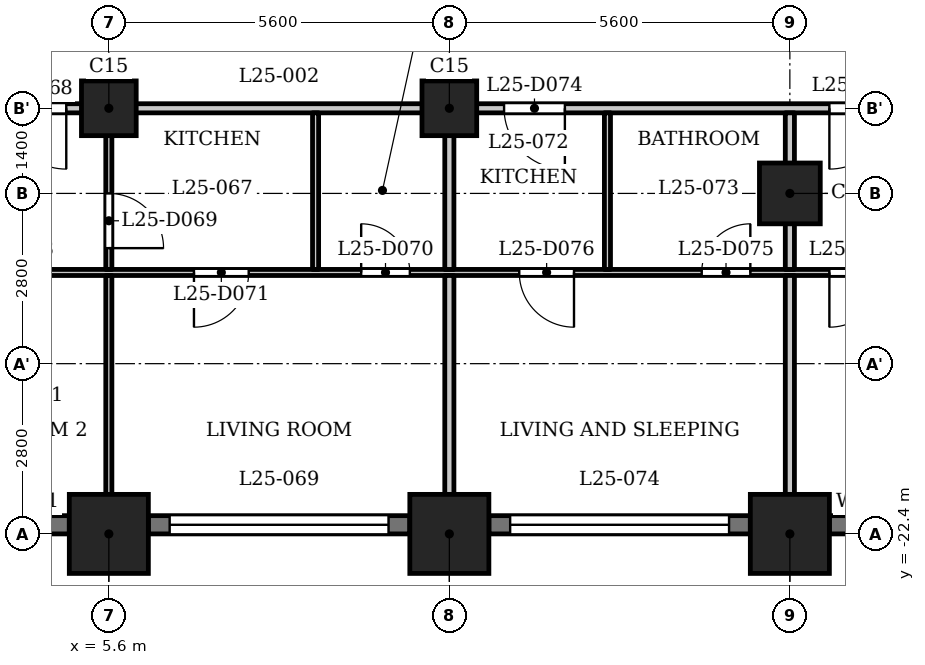
"""IFC4 building model, lengths in metres.
Left out: names, types, materials, properties, quantities, classifications, styles, units other than length and angle.
Written with IfcOpenShell. Run it as: python <this file> out.ifc"""

import sys

from ifc_helpers import new_model, si_unit, direction, frame, frame_2d, origin, origin_2d, place, context, subcontext, project, spatial, rectangle, extrude, element, fill, save


model = new_model("IFC4")
c1 = context("Model", 3, precision=1e-05, world=origin(), true_north=direction((0.0, 1.0)))
c2 = subcontext(c1, "Body", "Model", "MODEL_VIEW")
j1 = project(units=[si_unit("LENGTHUNIT", "METRE"), si_unit("PLANEANGLEUNIT", "RADIAN")], contexts=[c1])
p1 = place(None, origin())
s1 = spatial("IfcSite", under=j1, at=p1, CompositionType="ELEMENT")
p2 = place(p1, origin())
s2 = spatial("IfcBuilding", under=s1, at=p2, CompositionType="ELEMENT")
p3 = place(p2, frame((0.0, 0.0, 100.8)))
s3 = spatial("IfcBuildingStorey", under=s2, at=p3, CompositionType="ELEMENT", Elevation=100.8)
for number, where, z_axis, x_axis in (
    (1, (5.6, -22.4, 0.0), (0.0, 0.0, 1.0), (1.0, 0.0, 0.0)),
    (2, (11.2, -22.4, 0.0), (0.0, 0.0, 1.0), (1.0, 0.0, 0.0)),
    (3, (16.8, -22.4, 0.0), (0.0, 0.0, 1.0), (1.0, 0.0, 0.0)),
):
    element("IfcColumn", number, at=place(p3, frame(where, z_axis=z_axis, x_axis=x_axis)), inside=s3, PredefinedType="COLUMN", context=c2, shape_type="SweptSolid", body=[
        extrude(rectangle(XDim=1.3, YDim=1.3, at=origin_2d()), origin(), (0.0, 0.0, 1.0), 3.5),
    ])
p4 = place(p3, frame((16.8, -16.8, 0.0), z_axis=(0.0, 0.0, 1.0), x_axis=(1.0, 0.0, 0.0)))
e4 = element("IfcColumn", 4, at=p4, inside=s3, PredefinedType="COLUMN", context=c2, shape_type="SweptSolid", body=[
    extrude(rectangle(XDim=1.0, YDim=1.0, at=origin_2d()), origin(), (0.0, 0.0, 1.0), 3.5),
])
for number, where, z_axis, x_axis in (
    (5, (5.6, -15.4, 0.0), (0.0, 0.0, 1.0), (1.0, 0.0, 0.0)),
    (6, (11.2, -15.4, 0.0), (0.0, 0.0, 1.0), (1.0, 0.0, 0.0)),
):
    element("IfcColumn", number, at=place(p3, frame(where, z_axis=z_axis, x_axis=x_axis)), inside=s3, PredefinedType="COLUMN", context=c2, shape_type="SweptSolid", body=[
        extrude(rectangle(XDim=0.9, YDim=0.9, at=origin_2d()), origin(), (0.0, 0.0, 1.0), 3.5),
    ])
p5 = place(p3, frame((0.65, -22.25, 0.0), z_axis=(0.0, 0.0, 1.0), x_axis=(1.0, 0.0, 0.0)))
e7 = element("IfcWall", 7, at=p5, inside=s3, PredefinedType="SOLIDWALL", context=c2, shape_type="SweptSolid", body=[
    extrude(rectangle(XDim=4.3, YDim=0.3, at=frame_2d((2.15, 0.0))), origin(), (0.0, 0.0, 1.0), 2.4),
])
p6 = place(p5, frame((0.438, 0.0, 0.6)))
e8 = element("IfcOpeningElement", 8, at=p6, cuts=e7, PredefinedType="OPENING", context=c2, shape_type="SweptSolid", body=[
    extrude(rectangle(XDim=1.2, YDim=1.55, at=frame_2d((0.6, 0.775))), frame((0.0, 0.16, 0.0), z_axis=(0.0, -1.0, 0.0), x_axis=(1.0, 0.0, 0.0)), (0.0, 0.0, 1.0), 0.32),
])
p7 = place(p5, frame((2.663, 0.0, 0.6)))
e9 = element("IfcOpeningElement", 9, at=p7, cuts=e7, PredefinedType="OPENING", context=c2, shape_type="SweptSolid", body=[
    extrude(rectangle(XDim=1.2, YDim=1.55, at=frame_2d((0.6, 0.775))), frame((0.0, 0.16, 0.0), z_axis=(0.0, -1.0, 0.0), x_axis=(1.0, 0.0, 0.0)), (0.0, 0.0, 1.0), 0.32),
])
p8 = place(p3, frame((6.25, -22.25, 0.0), z_axis=(0.0, 0.0, 1.0), x_axis=(1.0, 0.0, 0.0)))
e10 = element("IfcWall", 10, at=p8, inside=s3, PredefinedType="SOLIDWALL", context=c2, shape_type="SweptSolid", body=[
    extrude(rectangle(XDim=4.3, YDim=0.3, at=frame_2d((2.15, 0.0))), origin(), (0.0, 0.0, 1.0), 2.4),
])
p9 = place(p8, frame((0.35, 0.0, 1.2)))
e11 = element("IfcOpeningElement", 11, at=p9, cuts=e10, PredefinedType="OPENING", context=c2, shape_type="SweptSolid", body=[
    extrude(rectangle(XDim=3.6, YDim=0.95, at=frame_2d((1.8, 0.475))), frame((0.0, 0.16, 0.0), z_axis=(0.0, -1.0, 0.0), x_axis=(1.0, 0.0, 0.0)), (0.0, 0.0, 1.0), 0.32),
])
p10 = place(p3, frame((11.85, -22.25, 0.0), z_axis=(0.0, 0.0, 1.0), x_axis=(1.0, 0.0, 0.0)))
e12 = element("IfcWall", 12, at=p10, inside=s3, PredefinedType="SOLIDWALL", context=c2, shape_type="SweptSolid", body=[
    extrude(rectangle(XDim=4.3, YDim=0.3, at=frame_2d((2.15, 0.0))), origin(), (0.0, 0.0, 1.0), 2.4),
])
p11 = place(p10, frame((0.35, 0.0, 1.2)))
e13 = element("IfcOpeningElement", 13, at=p11, cuts=e12, PredefinedType="OPENING", context=c2, shape_type="SweptSolid", body=[
    extrude(rectangle(XDim=3.6, YDim=0.95, at=frame_2d((1.8, 0.475))), frame((0.0, 0.16, 0.0), z_axis=(0.0, -1.0, 0.0), x_axis=(1.0, 0.0, 0.0)), (0.0, 0.0, 1.0), 0.32),
])
p12 = place(p3, frame((17.45, -22.25, 0.0), z_axis=(0.0, 0.0, 1.0), x_axis=(1.0, 0.0, 0.0)))
e14 = element("IfcWall", 14, at=p12, inside=s3, PredefinedType="SOLIDWALL", context=c2, shape_type="SweptSolid", body=[
    extrude(rectangle(XDim=2.55, YDim=0.3, at=frame_2d((1.275, 0.0))), origin(), (0.0, 0.0, 1.0), 2.4),
])
p13 = place(p12, frame((0.375, 0.0, 0.9)))
e15 = element("IfcOpeningElement", 15, at=p13, cuts=e14, PredefinedType="OPENING", context=c2, shape_type="SweptSolid", body=[
    extrude(rectangle(XDim=1.8, YDim=1.25, at=frame_2d((0.9, 0.625))), frame((0.0, 0.16, 0.0), z_axis=(0.0, -1.0, 0.0), x_axis=(1.0, 0.0, 0.0)), (0.0, 0.0, 1.0), 0.32),
])
p14 = place(p3, frame((-26.19, -18.1, 0.0), z_axis=(0.0, 0.0, 1.0), x_axis=(1.0, 0.0, 0.0)))
e16 = element("IfcWall", 16, at=p14, inside=s3, PredefinedType="PARTITIONING", context=c2, shape_type="SweptSolid", body=[
    extrude(rectangle(XDim=52.63, YDim=0.1, at=frame_2d((26.315, 0.0))), origin(), (0.0, 0.0, 1.0), 3.2),
])
p15 = place(p14, frame((1.09, 0.0, 0.0)))
e17 = element("IfcOpeningElement", 17, at=p15, cuts=e16, PredefinedType="OPENING", context=c2, shape_type="SweptSolid", body=[
    extrude(rectangle(XDim=0.8, YDim=2.1, at=frame_2d((0.4, 1.05))), frame((0.0, 0.06, 0.0), z_axis=(0.0, -1.0, 0.0), x_axis=(1.0, 0.0, 0.0)), (0.0, 0.0, 1.0), 0.12),
])
p16 = place(p14, frame((4.44, 0.0, 0.0)))
e18 = element("IfcOpeningElement", 18, at=p16, cuts=e16, PredefinedType="OPENING", context=c2, shape_type="SweptSolid", body=[
    extrude(rectangle(XDim=0.9, YDim=2.1, at=frame_2d((0.45, 1.05))), frame((0.0, 0.06, 0.0), z_axis=(0.0, -1.0, 0.0), x_axis=(1.0, 0.0, 0.0)), (0.0, 0.0, 1.0), 0.12),
])
p17 = place(p14, frame((10.04, 0.0, 0.0)))
e19 = element("IfcOpeningElement", 19, at=p17, cuts=e16, PredefinedType="OPENING", context=c2, shape_type="SweptSolid", body=[
    extrude(rectangle(XDim=0.8, YDim=2.1, at=frame_2d((0.4, 1.05))), frame((0.0, 0.06, 0.0), z_axis=(0.0, -1.0, 0.0), x_axis=(1.0, 0.0, 0.0)), (0.0, 0.0, 1.0), 0.12),
])
p18 = place(p14, frame((15.64, 0.0, 0.0)))
e20 = element("IfcOpeningElement", 20, at=p18, cuts=e16, PredefinedType="OPENING", context=c2, shape_type="SweptSolid", body=[
    extrude(rectangle(XDim=0.9, YDim=2.1, at=frame_2d((0.45, 1.05))), frame((0.0, 0.06, 0.0), z_axis=(0.0, -1.0, 0.0), x_axis=(1.0, 0.0, 0.0)), (0.0, 0.0, 1.0), 0.12),
])
p19 = place(p14, frame((24.74, 0.0, 0.0)))
e21 = element("IfcOpeningElement", 21, at=p19, cuts=e16, PredefinedType="OPENING", context=c2, shape_type="SweptSolid", body=[
    extrude(rectangle(XDim=0.8, YDim=2.1, at=frame_2d((0.4, 1.05))), frame((0.0, 0.06, 0.0), z_axis=(0.0, -1.0, 0.0), x_axis=(1.0, 0.0, 0.0)), (0.0, 0.0, 1.0), 0.12),
])
p20 = place(p14, frame((21.24, 0.0, 0.0)))
e22 = element("IfcOpeningElement", 22, at=p20, cuts=e16, PredefinedType="OPENING", context=c2, shape_type="SweptSolid", body=[
    extrude(rectangle(XDim=0.9, YDim=2.1, at=frame_2d((0.45, 1.05))), frame((0.0, 0.06, 0.0), z_axis=(0.0, -1.0, 0.0), x_axis=(1.0, 0.0, 0.0)), (0.0, 0.0, 1.0), 0.12),
])
p21 = place(p14, frame((35.94, 0.0, 0.0)))
e23 = element("IfcOpeningElement", 23, at=p21, cuts=e16, PredefinedType="OPENING", context=c2, shape_type="SweptSolid", body=[
    extrude(rectangle(XDim=0.8, YDim=2.1, at=frame_2d((0.4, 1.05))), frame((0.0, 0.06, 0.0), z_axis=(0.0, -1.0, 0.0), x_axis=(1.0, 0.0, 0.0)), (0.0, 0.0, 1.0), 0.12),
])
p22 = place(p14, frame((33.19, 0.0, 0.0)))
e24 = element("IfcOpeningElement", 24, at=p22, cuts=e16, PredefinedType="OPENING", context=c2, shape_type="SweptSolid", body=[
    extrude(rectangle(XDim=0.9, YDim=2.1, at=frame_2d((0.45, 1.05))), frame((0.0, 0.06, 0.0), z_axis=(0.0, -1.0, 0.0), x_axis=(1.0, 0.0, 0.0)), (0.0, 0.0, 1.0), 0.12),
])
p23 = place(p14, frame((27.59, 0.0, 0.0)))
e25 = element("IfcOpeningElement", 25, at=p23, cuts=e16, PredefinedType="OPENING", context=c2, shape_type="SweptSolid", body=[
    extrude(rectangle(XDim=0.9, YDim=2.1, at=frame_2d((0.45, 1.05))), frame((0.0, 0.06, 0.0), z_axis=(0.0, -1.0, 0.0), x_axis=(1.0, 0.0, 0.0)), (0.0, 0.0, 1.0), 0.12),
])
p24 = place(p14, frame((29.64, 0.0, 0.0)))
e26 = element("IfcOpeningElement", 26, at=p24, cuts=e16, PredefinedType="OPENING", context=c2, shape_type="SweptSolid", body=[
    extrude(rectangle(XDim=0.9, YDim=2.1, at=frame_2d((0.45, 1.05))), frame((0.0, 0.06, 0.0), z_axis=(0.0, -1.0, 0.0), x_axis=(1.0, 0.0, 0.0)), (0.0, 0.0, 1.0), 0.12),
])
p25 = place(p14, frame((41.54, 0.0, 0.0)))
e27 = element("IfcOpeningElement", 27, at=p25, cuts=e16, PredefinedType="OPENING", context=c2, shape_type="SweptSolid", body=[
    extrude(rectangle(XDim=0.8, YDim=2.1, at=frame_2d((0.4, 1.05))), frame((0.0, 0.06, 0.0), z_axis=(0.0, -1.0, 0.0), x_axis=(1.0, 0.0, 0.0)), (0.0, 0.0, 1.0), 0.12),
])
p26 = place(p14, frame((38.54, 0.0, 0.0)))
e28 = element("IfcOpeningElement", 28, at=p26, cuts=e16, PredefinedType="OPENING", context=c2, shape_type="SweptSolid", body=[
    extrude(rectangle(XDim=0.9, YDim=2.1, at=frame_2d((0.45, 1.05))), frame((0.0, 0.06, 0.0), z_axis=(0.0, -1.0, 0.0), x_axis=(1.0, 0.0, 0.0)), (0.0, 0.0, 1.0), 0.12),
])
p27 = place(p14, frame((49.204, 0.0, 0.0)))
e29 = element("IfcOpeningElement", 29, at=p27, cuts=e16, PredefinedType="OPENING", context=c2, shape_type="SweptSolid", body=[
    extrude(rectangle(XDim=0.8, YDim=2.1, at=frame_2d((0.4, 1.05))), frame((0.0, 0.06, 0.0), z_axis=(0.0, -1.0, 0.0), x_axis=(1.0, 0.0, 0.0)), (0.0, 0.0, 1.0), 0.12),
])
p28 = place(p14, frame((43.64, 0.0, 0.0)))
e30 = element("IfcOpeningElement", 30, at=p28, cuts=e16, PredefinedType="OPENING", context=c2, shape_type="SweptSolid", body=[
    extrude(rectangle(XDim=0.9, YDim=2.1, at=frame_2d((0.45, 1.05))), frame((0.0, 0.06, 0.0), z_axis=(0.0, -1.0, 0.0), x_axis=(1.0, 0.0, 0.0)), (0.0, 0.0, 1.0), 0.12),
])
p29 = place(p3, frame((-27.484, -15.4, 0.0), z_axis=(0.0, 0.0, 1.0), x_axis=(1.0, 0.0, 0.0)))
e31 = element("IfcWall", 31, at=p29, inside=s3, PredefinedType="PARTITIONING", context=c2, shape_type="SweptSolid", body=[
    extrude(rectangle(XDim=54.968, YDim=0.15, at=frame_2d((27.484, 0.0))), origin(), (0.0, 0.0, 1.0), 3.2),
])
p30 = place(p29, frame((5.734, 0.0, 0.0)))
e32 = element("IfcOpeningElement", 32, at=p30, cuts=e31, PredefinedType="OPENING", context=c2, shape_type="SweptSolid", body=[
    extrude(rectangle(XDim=1.0, YDim=2.1, at=frame_2d((0.5, 1.05))), frame((0.0, 0.085, 0.0), z_axis=(0.0, -1.0, 0.0), x_axis=(1.0, 0.0, 0.0)), (0.0, 0.0, 1.0), 0.17),
])
p31 = place(p29, frame((16.934, 0.0, 0.0)))
e33 = element("IfcOpeningElement", 33, at=p31, cuts=e31, PredefinedType="OPENING", context=c2, shape_type="SweptSolid", body=[
    extrude(rectangle(XDim=1.0, YDim=2.1, at=frame_2d((0.5, 1.05))), frame((0.0, 0.085, 0.0), z_axis=(0.0, -1.0, 0.0), x_axis=(1.0, 0.0, 0.0)), (0.0, 0.0, 1.0), 0.17),
])
p32 = place(p29, frame((22.534, 0.0, 0.0)))
e34 = element("IfcOpeningElement", 34, at=p32, cuts=e31, PredefinedType="OPENING", context=c2, shape_type="SweptSolid", body=[
    extrude(rectangle(XDim=1.0, YDim=2.1, at=frame_2d((0.5, 1.05))), frame((0.0, 0.085, 0.0), z_axis=(0.0, -1.0, 0.0), x_axis=(1.0, 0.0, 0.0)), (0.0, 0.0, 1.0), 0.17),
])
p33 = place(p29, frame((31.384, 0.0, 0.0)))
e35 = element("IfcOpeningElement", 35, at=p33, cuts=e31, PredefinedType="OPENING", context=c2, shape_type="SweptSolid", body=[
    extrude(rectangle(XDim=1.0, YDim=2.1, at=frame_2d((0.5, 1.05))), frame((0.0, 0.085, 0.0), z_axis=(0.0, -1.0, 0.0), x_axis=(1.0, 0.0, 0.0)), (0.0, 0.0, 1.0), 0.17),
])
p34 = place(p29, frame((39.584, 0.0, 0.0)))
e36 = element("IfcOpeningElement", 36, at=p34, cuts=e31, PredefinedType="OPENING", context=c2, shape_type="SweptSolid", body=[
    extrude(rectangle(XDim=1.0, YDim=2.1, at=frame_2d((0.5, 1.05))), frame((0.0, 0.085, 0.0), z_axis=(0.0, -1.0, 0.0), x_axis=(1.0, 0.0, 0.0)), (0.0, 0.0, 1.0), 0.17),
])
p35 = place(p29, frame((44.934, 0.0, 0.0)))
e37 = element("IfcOpeningElement", 37, at=p35, cuts=e31, PredefinedType="OPENING", context=c2, shape_type="SweptSolid", body=[
    extrude(rectangle(XDim=1.0, YDim=2.1, at=frame_2d((0.5, 1.05))), frame((0.0, 0.085, 0.0), z_axis=(0.0, -1.0, 0.0), x_axis=(1.0, 0.0, 0.0)), (0.0, 0.0, 1.0), 0.17),
])
p36 = place(p3, frame((5.6, -23.03, 0.0), z_axis=(0.0, 0.0, 1.0), x_axis=(0.0, 1.0, 0.0)))
e38 = element("IfcWall", 38, at=p36, inside=s3, PredefinedType="PARTITIONING", context=c2, shape_type="SweptSolid", body=[
    extrude(rectangle(XDim=4.88, YDim=0.1, at=frame_2d((2.44, 0.0))), origin(), (0.0, 0.0, 1.0), 3.2),
])
p37 = place(p3, frame((5.6, -18.05, 0.0), z_axis=(0.0, 0.0, 1.0), x_axis=(0.0, 1.0, 0.0)))
e39 = element("IfcWall", 39, at=p37, inside=s3, PredefinedType="PARTITIONING", context=c2, shape_type="SweptSolid", body=[
    extrude(rectangle(XDim=2.575, YDim=0.1, at=frame_2d((1.288, 0.0))), origin(), (0.0, 0.0, 1.0), 3.2),
])
p38 = place(p37, frame((0.35, 0.0, 0.0)))
e40 = element("IfcOpeningElement", 40, at=p38, cuts=e39, PredefinedType="OPENING", context=c2, shape_type="SweptSolid", body=[
    extrude(rectangle(XDim=0.9, YDim=2.1, at=frame_2d((0.45, 1.05))), frame((0.0, 0.06, 0.0), z_axis=(0.0, -1.0, 0.0), x_axis=(1.0, 0.0, 0.0)), (0.0, 0.0, 1.0), 0.12),
])
p39 = place(p3, frame((9.0, -18.05, 0.0), z_axis=(0.0, 0.0, 1.0), x_axis=(0.0, 1.0, 0.0)))
e41 = element("IfcWall", 41, at=p39, inside=s3, PredefinedType="PARTITIONING", context=c2, shape_type="SweptSolid", body=[
    extrude(rectangle(XDim=2.575, YDim=0.1, at=frame_2d((1.288, 0.0))), origin(), (0.0, 0.0, 1.0), 3.2),
])
p40 = place(p3, frame((11.2, -23.03, 0.0), z_axis=(0.0, 0.0, 1.0), x_axis=(0.0, 1.0, 0.0)))
e42 = element("IfcWall", 42, at=p40, inside=s3, PredefinedType="PARTITIONING", context=c2, shape_type="SweptSolid", body=[
    extrude(rectangle(XDim=4.88, YDim=0.15, at=frame_2d((2.44, 0.0))), origin(), (0.0, 0.0, 1.0), 3.2),
])
p41 = place(p3, frame((11.2, -18.05, 0.0), z_axis=(0.0, 0.0, 1.0), x_axis=(0.0, 1.0, 0.0)))
e43 = element("IfcWall", 43, at=p41, inside=s3, PredefinedType="PARTITIONING", context=c2, shape_type="SweptSolid", body=[
    extrude(rectangle(XDim=2.575, YDim=0.15, at=frame_2d((1.288, 0.0))), origin(), (0.0, 0.0, 1.0), 3.2),
])
p42 = place(p3, frame((13.8, -18.05, 0.0), z_axis=(0.0, 0.0, 1.0), x_axis=(0.0, 1.0, 0.0)))
e44 = element("IfcWall", 44, at=p42, inside=s3, PredefinedType="PARTITIONING", context=c2, shape_type="SweptSolid", body=[
    extrude(rectangle(XDim=2.575, YDim=0.1, at=frame_2d((1.288, 0.0))), origin(), (0.0, 0.0, 1.0), 3.2),
])
p43 = place(p3, frame((16.8, -23.03, 0.0), z_axis=(0.0, 0.0, 1.0), x_axis=(0.0, 1.0, 0.0)))
e45 = element("IfcWall", 45, at=p43, inside=s3, PredefinedType="PARTITIONING", context=c2, shape_type="SweptSolid", body=[
    extrude(rectangle(XDim=4.88, YDim=0.15, at=frame_2d((2.44, 0.0))), origin(), (0.0, 0.0, 1.0), 3.2),
])
p44 = place(p3, frame((16.8, -18.05, 0.0), z_axis=(0.0, 0.0, 1.0), x_axis=(0.0, 1.0, 0.0)))
e46 = element("IfcWall", 46, at=p44, inside=s3, PredefinedType="PARTITIONING", context=c2, shape_type="SweptSolid", body=[
    extrude(rectangle(XDim=2.575, YDim=0.15, at=frame_2d((1.288, 0.0))), origin(), (0.0, 0.0, 1.0), 3.2),
])
p45 = place(p33, origin())
e47 = element("IfcDoor", 47, at=p45, inside=s3, OperationType="SINGLE_SWING_RIGHT", PredefinedType="DOOR", context=c2, shape_type="SweptSolid", body=[
    extrude(rectangle(XDim=1.0, YDim=2.1, at=frame_2d((0.5, 1.05))), frame((0.0, 0.025, 0.0), z_axis=(0.0, -1.0, 0.0), x_axis=(1.0, 0.0, 0.0)), (0.0, 0.0, 1.0), 0.05),
])
fill(e35, e47)
p46 = place(p38, origin())
e48 = element("IfcDoor", 48, at=p46, inside=s3, OperationType="SINGLE_SWING_LEFT", PredefinedType="DOOR", context=c2, shape_type="SweptSolid", body=[
    extrude(rectangle(XDim=0.9, YDim=2.1, at=frame_2d((0.45, 1.05))), frame((0.0, 0.025, 0.0), z_axis=(0.0, -1.0, 0.0), x_axis=(1.0, 0.0, 0.0)), (0.0, 0.0, 1.0), 0.05),
])
fill(e40, e48)
p47 = place(p21, origin())
e49 = element("IfcDoor", 49, at=p47, inside=s3, OperationType="SINGLE_SWING_RIGHT", PredefinedType="DOOR", context=c2, shape_type="SweptSolid", body=[
    extrude(rectangle(XDim=0.8, YDim=2.1, at=frame_2d((0.4, 1.05))), frame((0.0, 0.025, 0.0), z_axis=(0.0, -1.0, 0.0), x_axis=(1.0, 0.0, 0.0)), (0.0, 0.0, 1.0), 0.05),
])
fill(e23, e49)
p48 = place(p22, origin())
e50 = element("IfcDoor", 50, at=p48, inside=s3, OperationType="SINGLE_SWING_LEFT", PredefinedType="DOOR", context=c2, shape_type="SweptSolid", body=[
    extrude(rectangle(XDim=0.9, YDim=2.1, at=frame_2d((0.45, 1.05))), frame((0.0, 0.025, 0.0), z_axis=(0.0, -1.0, 0.0), x_axis=(1.0, 0.0, 0.0)), (0.0, 0.0, 1.0), 0.05),
])
fill(e24, e50)
p49 = place(p34, origin())
e51 = element("IfcDoor", 51, at=p49, inside=s3, OperationType="SINGLE_SWING_RIGHT", PredefinedType="DOOR", context=c2, shape_type="SweptSolid", body=[
    extrude(rectangle(XDim=1.0, YDim=2.1, at=frame_2d((0.5, 1.05))), frame((0.0, 0.025, 0.0), z_axis=(0.0, -1.0, 0.0), x_axis=(1.0, 0.0, 0.0)), (0.0, 0.0, 1.0), 0.05),
])
fill(e36, e51)
p50 = place(p25, origin())
e52 = element("IfcDoor", 52, at=p50, inside=s3, OperationType="SINGLE_SWING_LEFT", PredefinedType="DOOR", context=c2, shape_type="SweptSolid", body=[
    extrude(rectangle(XDim=0.8, YDim=2.1, at=frame_2d((0.4, 1.05))), frame((0.0, 0.025, 0.0), z_axis=(0.0, -1.0, 0.0), x_axis=(1.0, 0.0, 0.0)), (0.0, 0.0, 1.0), 0.05),
])
fill(e27, e52)
p51 = place(p26, origin())
e53 = element("IfcDoor", 53, at=p51, inside=s3, OperationType="SINGLE_SWING_RIGHT", PredefinedType="DOOR", context=c2, shape_type="SweptSolid", body=[
    extrude(rectangle(XDim=0.9, YDim=2.1, at=frame_2d((0.45, 1.05))), frame((0.0, 0.025, 0.0), z_axis=(0.0, -1.0, 0.0), x_axis=(1.0, 0.0, 0.0)), (0.0, 0.0, 1.0), 0.05),
])
fill(e28, e53)
p52 = place(p35, origin())
e54 = element("IfcDoor", 54, at=p52, inside=s3, OperationType="SINGLE_SWING_LEFT", PredefinedType="DOOR", context=c2, shape_type="SweptSolid", body=[
    extrude(rectangle(XDim=1.0, YDim=2.1, at=frame_2d((0.5, 1.05))), frame((0.0, 0.025, 0.0), z_axis=(0.0, -1.0, 0.0), x_axis=(1.0, 0.0, 0.0)), (0.0, 0.0, 1.0), 0.05),
])
fill(e37, e54)
p53 = place(p28, origin())
e55 = element("IfcDoor", 55, at=p53, inside=s3, OperationType="SINGLE_SWING_LEFT", PredefinedType="DOOR", context=c2, shape_type="SweptSolid", body=[
    extrude(rectangle(XDim=0.9, YDim=2.1, at=frame_2d((0.45, 1.05))), frame((0.0, 0.025, 0.0), z_axis=(0.0, -1.0, 0.0), x_axis=(1.0, 0.0, 0.0)), (0.0, 0.0, 1.0), 0.05),
])
fill(e30, e55)
p54 = place(p9, origin())
e56 = element("IfcWindow", 56, at=p54, inside=s3, PartitioningType="SINGLE_PANEL", PredefinedType="WINDOW", context=c2, shape_type="SweptSolid", body=[
    extrude(rectangle(XDim=3.6, YDim=0.95, at=frame_2d((1.8, 0.475))), frame((0.0, 0.03, 0.0), z_axis=(0.0, -1.0, 0.0), x_axis=(1.0, 0.0, 0.0)), (0.0, 0.0, 1.0), 0.06),
])
fill(e11, e56)
p55 = place(p11, origin())
e57 = element("IfcWindow", 57, at=p55, inside=s3, PartitioningType="SINGLE_PANEL", PredefinedType="WINDOW", context=c2, shape_type="SweptSolid", body=[
    extrude(rectangle(XDim=3.6, YDim=0.95, at=frame_2d((1.8, 0.475))), frame((0.0, 0.03, 0.0), z_axis=(0.0, -1.0, 0.0), x_axis=(1.0, 0.0, 0.0)), (0.0, 0.0, 1.0), 0.06),
])
fill(e13, e57)
save(model, sys.argv[1])
